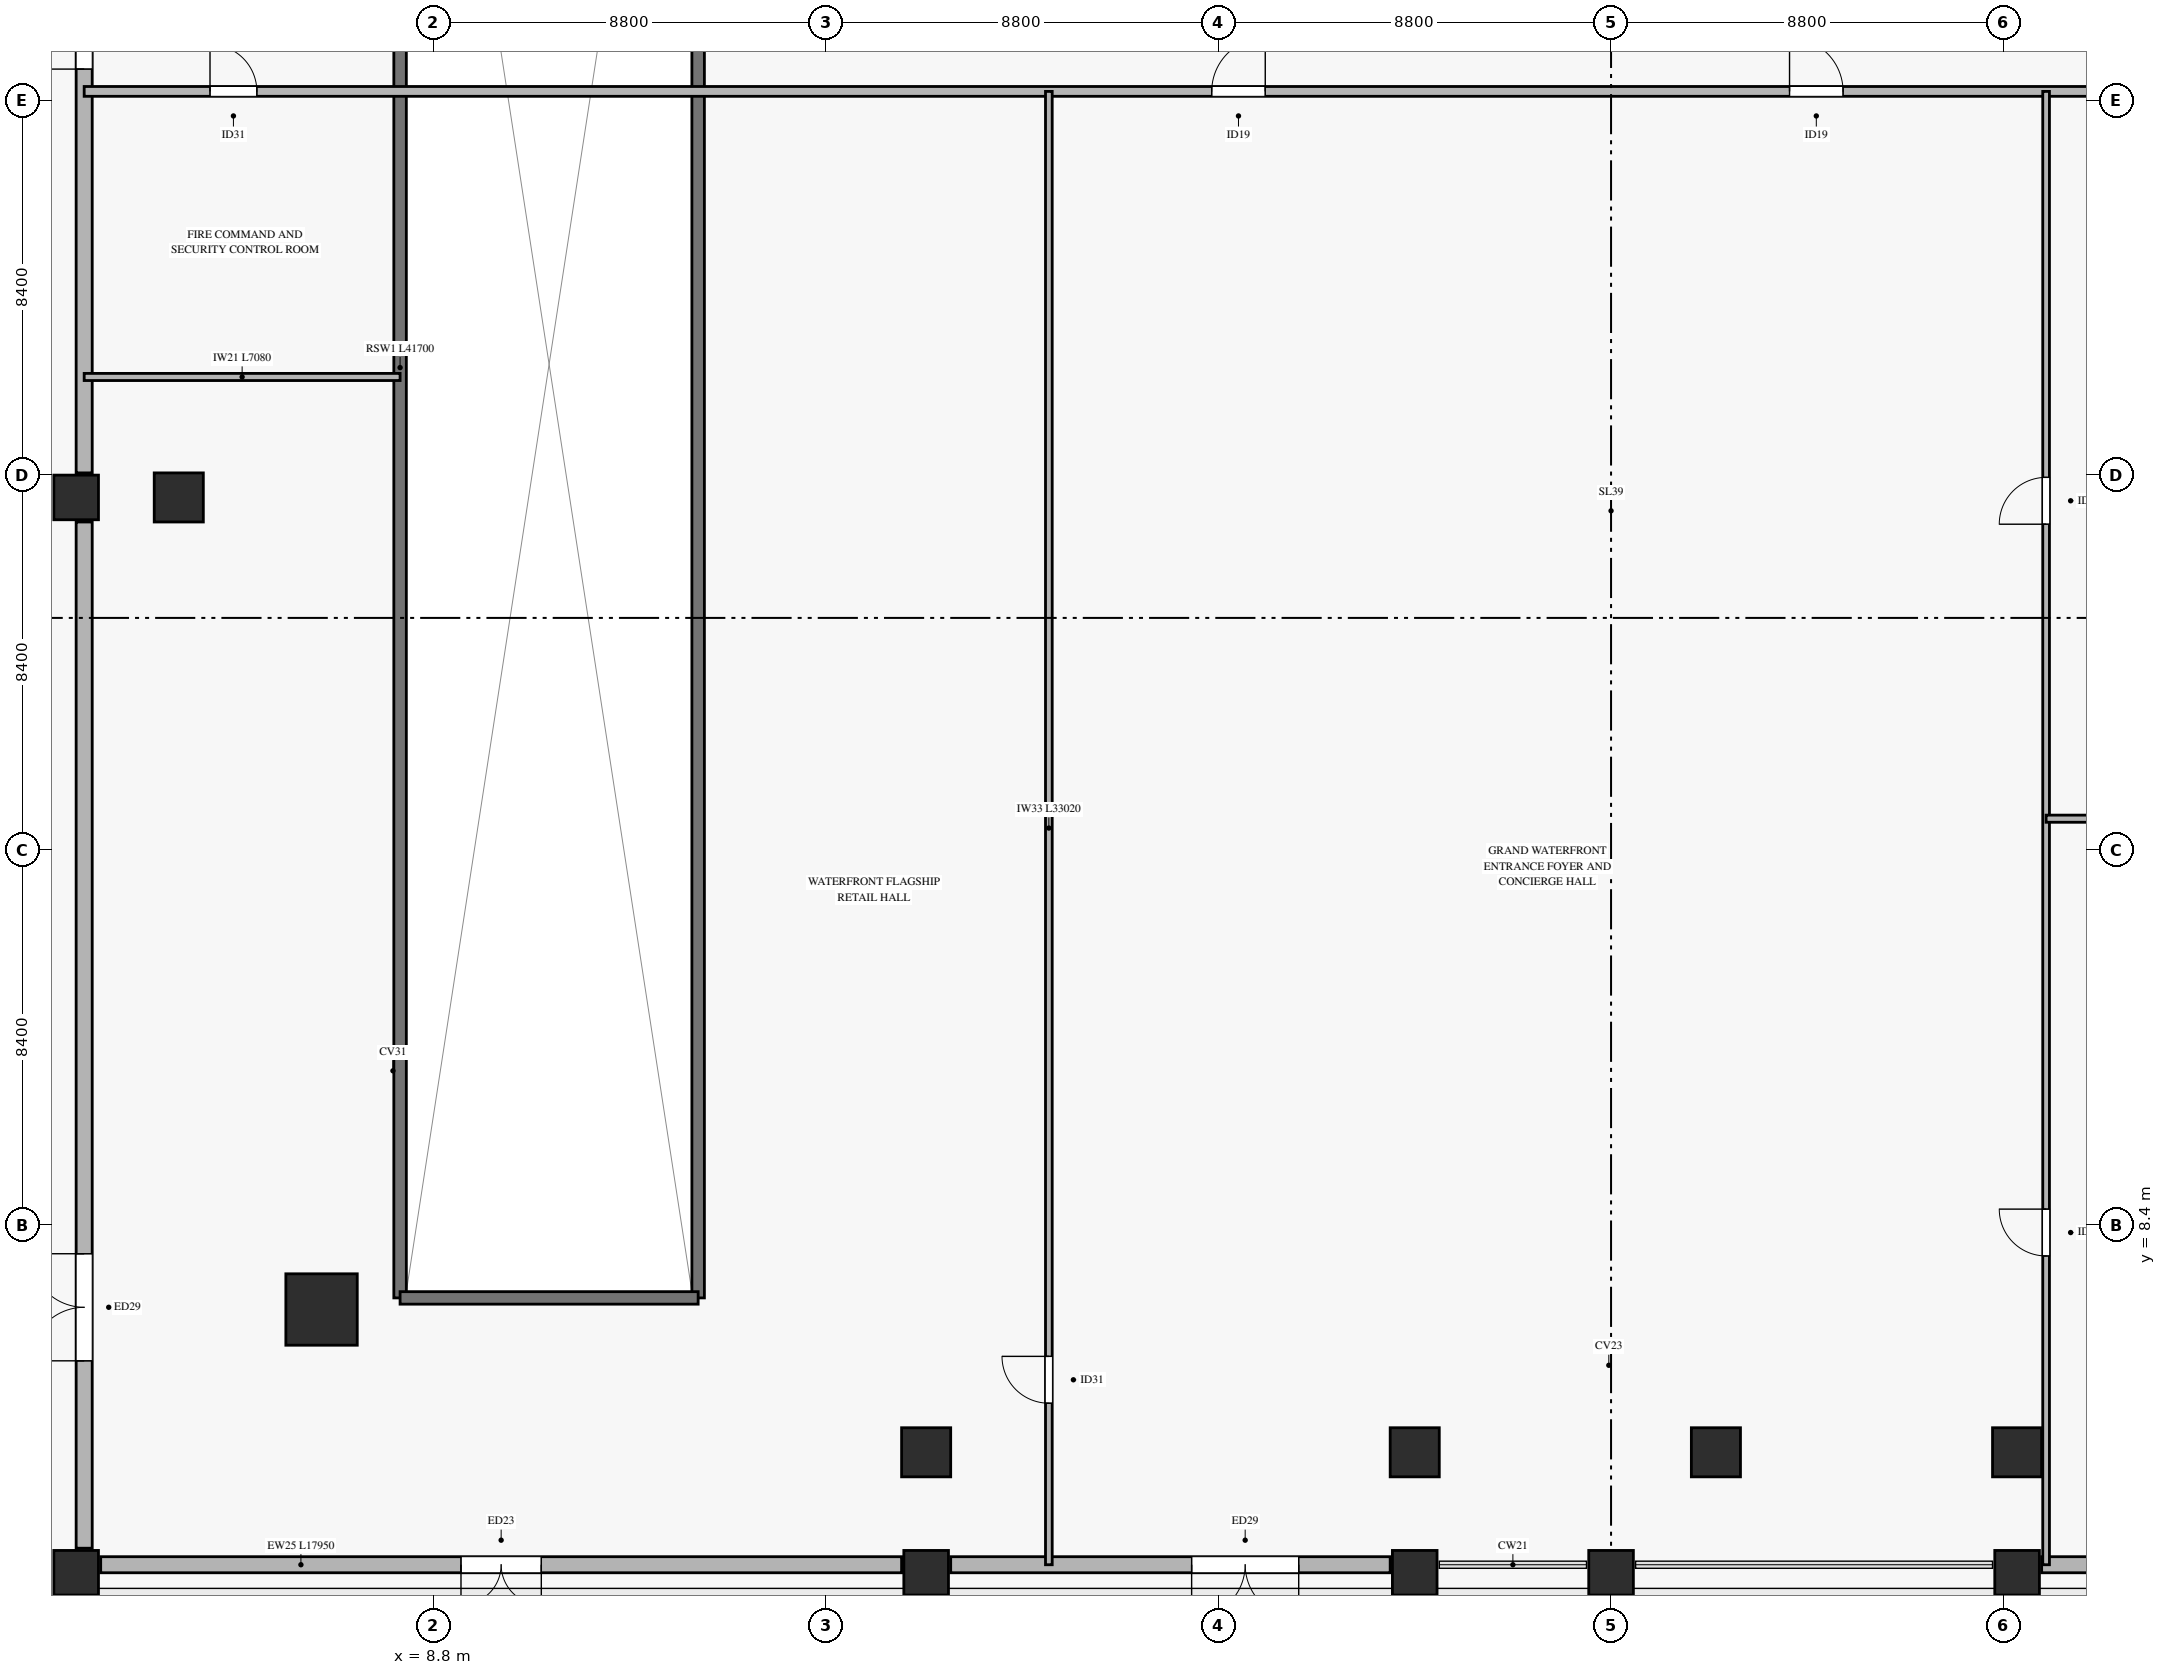
"""IFC4 building model, lengths in metres.
Left out: names, types, materials, properties, quantities, classifications, styles, units other than length and angle.
Written with IfcOpenShell. Run it as: python <this file> out.ifc"""

import sys

from ifc_helpers import new_model, si_unit, direction, frame, frame_2d, origin, origin_2d, place, context, subcontext, project, spatial, rectangle, hollow_rectangle, extrude, source, transform, mapped, element, fill, save


model = new_model("IFC4")
c1 = context("Model", 3, precision=1e-05, world=origin(), true_north=direction((0.0, 1.0)))
c2 = subcontext(c1, "Body", "Model", "MODEL_VIEW")
j1 = project(units=[si_unit("LENGTHUNIT", "METRE"), si_unit("PLANEANGLEUNIT", "RADIAN")], contexts=[c1])
p1 = place(None, origin())
s1 = spatial("IfcSite", under=j1, at=p1, CompositionType="ELEMENT")
p2 = place(p1, origin())
s2 = spatial("IfcBuilding", under=s1, at=p2, CompositionType="ELEMENT")
p3 = place(p2, origin())
s3 = spatial("IfcBuildingStorey", under=s2, at=p3, CompositionType="ELEMENT", Elevation=0.0)
m1 = source(origin(), c2, "Body", "SweptSolid", [
    extrude(hollow_rectangle(XDim=1.6, YDim=1.6, WallThickness=0.075, at=origin_2d()), origin(), (0.0, 0.0, 1.0), 5.34),
])
p4 = place(p3, frame((6.3, 6.5, 0.0), z_axis=(0.0, 0.0, 1.0), x_axis=(1.0, 0.0, 0.0)))
e1 = element("IfcColumn", 1, at=p4, inside=s3, PredefinedType="COLUMN", context=c2, shape_type="MappedRepresentation", body=[
    mapped(m1, transform((0.0, 0.0, 0.0), x_axis=(1.0, 0.0, 0.0), y_axis=(0.0, 1.0, 0.0), z_axis=(0.0, 0.0, 1.0), scale=1.0)),
])
m2 = source(origin(), c2, "Body", "SweptSolid", [
    extrude(hollow_rectangle(XDim=1.1, YDim=1.1, WallThickness=0.05, at=origin_2d()), origin(), (0.0, 0.0, 1.0), 5.34),
])
for number, where, z_axis, x_axis in (
    (2, (19.85, 3.3, 0.0), (0.0, 0.0, 1.0), (1.0, 0.0, 0.0)),
    (3, (30.8, 3.3, 0.0), (0.0, 0.0, 1.0), (1.0, 0.0, 0.0)),
    (4, (37.55, 3.3, 0.0), (0.0, 0.0, 1.0), (1.0, 0.0, 0.0)),
    (5, (44.3, 3.3, 0.0), (0.0, 0.0, 1.0), (1.0, 0.0, 0.0)),
    (6, (3.1, 24.7, 0.0), (0.0, 0.0, 1.0), (1.0, 0.0, 0.0)),
):
    element("IfcColumn", number, at=place(p3, frame(where, z_axis=z_axis, x_axis=x_axis)), inside=s3, PredefinedType="COLUMN", context=c2, shape_type="MappedRepresentation", body=[
        mapped(m2, transform((0.0, 0.0, 0.0), x_axis=(1.0, 0.0, 0.0), y_axis=(0.0, 1.0, 0.0), z_axis=(0.0, 0.0, 1.0), scale=1.0)),
    ])
m3 = source(origin(), c2, "Body", "SweptSolid", [
    extrude(hollow_rectangle(XDim=1.0, YDim=1.0, WallThickness=0.045, at=origin_2d()), origin(), (0.0, 0.0, 1.0), 5.34),
])
for number, where, z_axis, x_axis in (
    (7, (0.8, 0.6, 0.0), (0.0, 0.0, 1.0), (1.0, 0.0, 0.0)),
    (8, (19.85, 0.6, 0.0), (0.0, 0.0, 1.0), (1.0, 0.0, 0.0)),
    (9, (30.8, 0.6, 0.0), (0.0, 0.0, 1.0), (1.0, 0.0, 0.0)),
    (10, (35.2, 0.6, 0.0), (0.0, 0.0, 1.0), (1.0, 0.0, 0.0)),
    (11, (44.3, 0.6, 0.0), (0.0, 0.0, 1.0), (1.0, 0.0, 0.0)),
    (12, (0.8, 24.7, 0.0), (0.0, 0.0, 1.0), (1.0, 0.0, 0.0)),
):
    element("IfcColumn", number, at=place(p3, frame(where, z_axis=z_axis, x_axis=x_axis)), inside=s3, PredefinedType="COLUMN", context=c2, shape_type="MappedRepresentation", body=[
        mapped(m3, transform((0.0, 0.0, 0.0), x_axis=(1.0, 0.0, 0.0), y_axis=(0.0, 1.0, 0.0), z_axis=(0.0, 0.0, 1.0), scale=1.0)),
    ])
for number, where, z_axis, x_axis in (
    (13, (8.06, 6.76, 0.0), (0.0, 0.0, 1.0), (0.0, 1.0, 0.0)),
    (14, (14.74, 6.76, 0.0), (0.0, 0.0, 1.0), (0.0, 1.0, 0.0)),
):
    element("IfcWall", number, at=place(p3, frame(where, z_axis=z_axis, x_axis=x_axis)), inside=s3, PredefinedType="SOLIDWALL", context=c2, shape_type="SweptSolid", body=[
        extrude(rectangle(XDim=41.7, YDim=0.28, at=frame_2d((20.85, 0.0))), origin(), (0.0, 0.0, 1.0), 4.35),
    ])
p5 = place(p3, frame((8.06, 6.76, 0.0), z_axis=(0.0, 0.0, 1.0), x_axis=(1.0, 0.0, 0.0)))
e15 = element("IfcWall", 15, at=p5, inside=s3, PredefinedType="SOLIDWALL", context=c2, shape_type="SweptSolid", body=[
    extrude(rectangle(XDim=6.68, YDim=0.28, at=frame_2d((3.34, 0.0))), origin(), (0.0, 0.0, 1.0), 4.35),
])
p6 = place(p3, frame((1.35, 0.78, 0.0), z_axis=(0.0, 0.0, 1.0), x_axis=(1.0, 0.0, 0.0)))
e16 = element("IfcWall", 16, at=p6, inside=s3, PredefinedType="SOLIDWALL", context=c2, shape_type="SweptSolid", body=[
    extrude(rectangle(XDim=17.95, YDim=0.36, at=frame_2d((8.975, 0.0))), origin(), (0.0, 0.0, 1.0), 4.22),
])
p7 = place(p6, frame((8.075, 0.0, 0.0)))
e17 = element("IfcOpeningElement", 17, at=p7, cuts=e16, PredefinedType="OPENING", context=c2, shape_type="SweptSolid", body=[
    extrude(rectangle(XDim=1.8, YDim=2.4, at=frame_2d((0.9, 1.2))), frame((0.0, 0.19, 0.0), z_axis=(0.0, -1.0, 0.0), x_axis=(1.0, 0.0, 0.0)), (0.0, 0.0, 1.0), 0.38),
])
p8 = place(p3, frame((20.4, 0.78, 0.0), z_axis=(0.0, 0.0, 1.0), x_axis=(1.0, 0.0, 0.0)))
e18 = element("IfcWall", 18, at=p8, inside=s3, PredefinedType="SOLIDWALL", context=c2, shape_type="SweptSolid", body=[
    extrude(rectangle(XDim=9.85, YDim=0.36, at=frame_2d((4.925, 0.0))), origin(), (0.0, 0.0, 1.0), 4.22),
])
p9 = place(p8, frame((5.4, 0.0, 0.0)))
e19 = element("IfcOpeningElement", 19, at=p9, cuts=e18, PredefinedType="OPENING", context=c2, shape_type="SweptSolid", body=[
    extrude(rectangle(XDim=2.4, YDim=2.6, at=frame_2d((1.2, 1.3))), frame((0.0, 0.19, 0.0), z_axis=(0.0, -1.0, 0.0), x_axis=(1.0, 0.0, 0.0)), (0.0, 0.0, 1.0), 0.38),
])
p10 = place(p3, frame((44.85, 0.78, 0.0), z_axis=(0.0, 0.0, 1.0), x_axis=(1.0, 0.0, 0.0)))
e20 = element("IfcWall", 20, at=p10, inside=s3, PredefinedType="SOLIDWALL", context=c2, shape_type="SweptSolid", body=[
    extrude(rectangle(XDim=5.15, YDim=0.36, at=frame_2d((2.575, 0.0))), origin(), (0.0, 0.0, 1.0), 4.22),
])
p11 = place(p10, frame((2.2, 0.0, 0.0)))
e21 = element("IfcOpeningElement", 21, at=p11, cuts=e20, PredefinedType="OPENING", context=c2, shape_type="SweptSolid", body=[
    extrude(rectangle(XDim=2.4, YDim=2.6, at=frame_2d((1.2, 1.3))), frame((0.0, 0.19, 0.0), z_axis=(0.0, -1.0, 0.0), x_axis=(1.0, 0.0, 0.0)), (0.0, 0.0, 1.0), 0.38),
])
p12 = place(p3, frame((0.98, 1.15, 0.0), z_axis=(0.0, 0.0, 1.0), x_axis=(0.0, 1.0, 0.0)))
e22 = element("IfcWall", 22, at=p12, inside=s3, PredefinedType="SOLIDWALL", context=c2, shape_type="SweptSolid", body=[
    extrude(rectangle(XDim=23.0, YDim=0.36, at=frame_2d((11.5, 0.0))), origin(), (0.0, 0.0, 1.0), 4.22),
])
p13 = place(p12, frame((4.2, 0.0, 0.0)))
e23 = element("IfcOpeningElement", 23, at=p13, cuts=e22, PredefinedType="OPENING", context=c2, shape_type="SweptSolid", body=[
    extrude(rectangle(XDim=2.4, YDim=2.6, at=frame_2d((1.2, 1.3))), frame((0.0, 0.19, 0.0), z_axis=(0.0, -1.0, 0.0), x_axis=(1.0, 0.0, 0.0)), (0.0, 0.0, 1.0), 0.38),
])
p14 = place(p3, frame((0.98, 25.25, 0.0), z_axis=(0.0, 0.0, 1.0), x_axis=(0.0, 1.0, 0.0)))
e24 = element("IfcWall", 24, at=p14, inside=s3, PredefinedType="SOLIDWALL", context=c2, shape_type="SweptSolid", body=[
    extrude(rectangle(XDim=11.65, YDim=0.36, at=frame_2d((5.825, 0.0))), origin(), (0.0, 0.0, 1.0), 4.22),
])
p15 = place(p14, frame((9.05, 0.0, 0.0)))
e25 = element("IfcOpeningElement", 25, at=p15, cuts=e24, PredefinedType="OPENING", context=c2, shape_type="SweptSolid", body=[
    extrude(rectangle(XDim=2.4, YDim=2.6, at=frame_2d((1.2, 1.3))), frame((0.0, 0.19, 0.0), z_axis=(0.0, -1.0, 0.0), x_axis=(1.0, 0.0, 0.0)), (0.0, 0.0, 1.0), 0.38),
])
p16 = place(p3, frame((0.98, 33.8, 0.0), z_axis=(0.0, 0.0, 1.0), x_axis=(1.0, 0.0, 0.0)))
e26 = element("IfcWall", 26, at=p16, inside=s3, PredefinedType="SOLIDWALL", context=c2, shape_type="SweptSolid", body=[
    extrude(rectangle(XDim=68.44, YDim=0.22, at=frame_2d((34.22, 0.0))), origin(), (0.0, 0.0, 1.0), 4.225),
])
p17 = place(p16, frame((25.27, 0.0, 0.0)))
e27 = element("IfcOpeningElement", 27, at=p17, cuts=e26, PredefinedType="OPENING", context=c2, shape_type="SweptSolid", body=[
    extrude(rectangle(XDim=1.2, YDim=2.15, at=frame_2d((0.6, 1.075))), frame((0.0, 0.12, 0.0), z_axis=(0.0, -1.0, 0.0), x_axis=(1.0, 0.0, 0.0)), (0.0, 0.0, 1.0), 0.24),
])
p18 = place(p16, frame((38.22, 0.0, 0.0)))
e28 = element("IfcOpeningElement", 28, at=p18, cuts=e26, PredefinedType="OPENING", context=c2, shape_type="SweptSolid", body=[
    extrude(rectangle(XDim=1.2, YDim=2.15, at=frame_2d((0.6, 1.075))), frame((0.0, 0.12, 0.0), z_axis=(0.0, -1.0, 0.0), x_axis=(1.0, 0.0, 0.0)), (0.0, 0.0, 1.0), 0.24),
])
p19 = place(p16, frame((2.82, 0.0, 0.0)))
e29 = element("IfcOpeningElement", 29, at=p19, cuts=e26, PredefinedType="OPENING", context=c2, shape_type="SweptSolid", body=[
    extrude(rectangle(XDim=1.05, YDim=2.15, at=frame_2d((0.525, 1.075))), frame((0.0, 0.12, 0.0), z_axis=(0.0, -1.0, 0.0), x_axis=(1.0, 0.0, 0.0)), (0.0, 0.0, 1.0), 0.24),
])
p20 = place(p3, frame((22.6, 0.78, 0.0), z_axis=(0.0, 0.0, 1.0), x_axis=(0.0, 1.0, 0.0)))
e30 = element("IfcWall", 30, at=p20, inside=s3, PredefinedType="PARTITIONING", context=c2, shape_type="SweptSolid", body=[
    extrude(rectangle(XDim=33.02, YDim=0.15, at=frame_2d((16.51, 0.0))), origin(), (0.0, 0.0, 1.0), 4.225),
])
p21 = place(p20, frame((3.62, 0.0, 0.0)))
e31 = element("IfcOpeningElement", 31, at=p21, cuts=e30, PredefinedType="OPENING", context=c2, shape_type="SweptSolid", body=[
    extrude(rectangle(XDim=1.05, YDim=2.15, at=frame_2d((0.525, 1.075))), frame((0.0, 0.085, 0.0), z_axis=(0.0, -1.0, 0.0), x_axis=(1.0, 0.0, 0.0)), (0.0, 0.0, 1.0), 0.17),
])
p22 = place(p3, frame((44.95, 0.78, 0.0), z_axis=(0.0, 0.0, 1.0), x_axis=(0.0, 1.0, 0.0)))
e32 = element("IfcWall", 32, at=p22, inside=s3, PredefinedType="PARTITIONING", context=c2, shape_type="SweptSolid", body=[
    extrude(rectangle(XDim=33.02, YDim=0.15, at=frame_2d((16.51, 0.0))), origin(), (0.0, 0.0, 1.0), 4.225),
])
p23 = place(p22, frame((6.92, 0.0, 0.0)))
e33 = element("IfcOpeningElement", 33, at=p23, cuts=e32, PredefinedType="OPENING", context=c2, shape_type="SweptSolid", body=[
    extrude(rectangle(XDim=1.05, YDim=2.15, at=frame_2d((0.525, 1.075))), frame((0.0, 0.085, 0.0), z_axis=(0.0, -1.0, 0.0), x_axis=(1.0, 0.0, 0.0)), (0.0, 0.0, 1.0), 0.17),
])
p24 = place(p22, frame((23.32, 0.0, 0.0)))
e34 = element("IfcOpeningElement", 34, at=p24, cuts=e32, PredefinedType="OPENING", context=c2, shape_type="SweptSolid", body=[
    extrude(rectangle(XDim=1.05, YDim=2.15, at=frame_2d((0.525, 1.075))), frame((0.0, 0.085, 0.0), z_axis=(0.0, -1.0, 0.0), x_axis=(1.0, 0.0, 0.0)), (0.0, 0.0, 1.0), 0.17),
])
p25 = place(p3, frame((0.98, 27.4, 0.0), z_axis=(0.0, 0.0, 1.0), x_axis=(1.0, 0.0, 0.0)))
e35 = element("IfcWall", 35, at=p25, inside=s3, PredefinedType="PARTITIONING", context=c2, shape_type="SweptSolid", body=[
    extrude(rectangle(XDim=7.08, YDim=0.16, at=frame_2d((3.54, 0.0))), origin(), (0.0, 0.0, 1.0), 4.225),
])
p26 = place(p3, frame((44.95, 17.5, 0.0), z_axis=(0.0, 0.0, 1.0), x_axis=(1.0, 0.0, 0.0)))
e36 = element("IfcWall", 36, at=p26, inside=s3, PredefinedType="PARTITIONING", context=c2, shape_type="SweptSolid", body=[
    extrude(rectangle(XDim=24.47, YDim=0.16, at=frame_2d((12.235, 0.0))), origin(), (0.0, 0.0, 1.0), 4.225),
])
m4 = source(origin(), c2, "Body", "SweptSolid", [
    extrude(rectangle(XDim=1.8, YDim=2.4, at=frame_2d((0.9, 1.2))), frame((0.0, 0.025, 0.0), z_axis=(0.0, -1.0, 0.0), x_axis=(1.0, 0.0, 0.0)), (0.0, 0.0, 1.0), 0.05),
])
p27 = place(p7, frame((1.8, 0.0, 0.0), z_axis=(0.0, 0.0, 1.0), x_axis=(-1.0, 0.0, 0.0)))
e37 = element("IfcDoor", 37, at=p27, inside=s3, OperationType="DOUBLE_SWING_LEFT", PredefinedType="DOOR", context=c2, shape_type="MappedRepresentation", body=[
    mapped(m4, transform((0.0, 0.0, 0.0), x_axis=(1.0, 0.0, 0.0), y_axis=(0.0, 1.0, 0.0), z_axis=(0.0, 0.0, 1.0), scale=1.0)),
])
fill(e17, e37)
m5 = source(origin(), c2, "Body", "SweptSolid", [
    extrude(rectangle(XDim=2.4, YDim=2.6, at=frame_2d((1.2, 1.3))), frame((0.0, 0.025, 0.0), z_axis=(0.0, -1.0, 0.0), x_axis=(1.0, 0.0, 0.0)), (0.0, 0.0, 1.0), 0.05),
])
p28 = place(p9, frame((2.4, 0.0, 0.0), z_axis=(0.0, 0.0, 1.0), x_axis=(-1.0, 0.0, 0.0)))
e38 = element("IfcDoor", 38, at=p28, inside=s3, OperationType="DOUBLE_SWING_RIGHT", PredefinedType="DOOR", context=c2, shape_type="MappedRepresentation", body=[
    mapped(m5, transform((0.0, 0.0, 0.0), x_axis=(1.0, 0.0, 0.0), y_axis=(0.0, 1.0, 0.0), z_axis=(0.0, 0.0, 1.0), scale=1.0)),
])
fill(e19, e38)
p29 = place(p13, origin())
e39 = element("IfcDoor", 39, at=p29, inside=s3, OperationType="DOUBLE_SWING_LEFT", PredefinedType="DOOR", context=c2, shape_type="MappedRepresentation", body=[
    mapped(m5, transform((0.0, 0.0, 0.0), x_axis=(1.0, 0.0, 0.0), y_axis=(0.0, 1.0, 0.0), z_axis=(0.0, 0.0, 1.0), scale=1.0)),
])
fill(e23, e39)
p30 = place(p15, origin())
e40 = element("IfcDoor", 40, at=p30, inside=s3, OperationType="DOUBLE_SWING_LEFT", PredefinedType="DOOR", context=c2, shape_type="MappedRepresentation", body=[
    mapped(m5, transform((0.0, 0.0, 0.0), x_axis=(1.0, 0.0, 0.0), y_axis=(0.0, 1.0, 0.0), z_axis=(0.0, 0.0, 1.0), scale=1.0)),
])
fill(e25, e40)
m6 = source(origin(), c2, "Body", "SweptSolid", [
    extrude(rectangle(XDim=1.2, YDim=2.15, at=frame_2d((0.6, 1.075))), frame((0.0, 0.025, 0.0), z_axis=(0.0, -1.0, 0.0), x_axis=(1.0, 0.0, 0.0)), (0.0, 0.0, 1.0), 0.05),
])
p31 = place(p17, origin())
e41 = element("IfcDoor", 41, at=p31, inside=s3, OperationType="SINGLE_SWING_RIGHT", PredefinedType="DOOR", context=c2, shape_type="MappedRepresentation", body=[
    mapped(m6, transform((0.0, 0.0, 0.0), x_axis=(1.0, 0.0, 0.0), y_axis=(0.0, 1.0, 0.0), z_axis=(0.0, 0.0, 1.0), scale=1.0)),
])
fill(e27, e41)
p32 = place(p18, origin())
e42 = element("IfcDoor", 42, at=p32, inside=s3, OperationType="SINGLE_SWING_LEFT", PredefinedType="DOOR", context=c2, shape_type="MappedRepresentation", body=[
    mapped(m6, transform((0.0, 0.0, 0.0), x_axis=(1.0, 0.0, 0.0), y_axis=(0.0, 1.0, 0.0), z_axis=(0.0, 0.0, 1.0), scale=1.0)),
])
fill(e28, e42)
m7 = source(origin(), c2, "Body", "SweptSolid", [
    extrude(rectangle(XDim=1.05, YDim=2.15, at=frame_2d((0.525, 1.075))), frame((0.0, 0.025, 0.0), z_axis=(0.0, -1.0, 0.0), x_axis=(1.0, 0.0, 0.0)), (0.0, 0.0, 1.0), 0.05),
])
p33 = place(p21, origin())
e43 = element("IfcDoor", 43, at=p33, inside=s3, OperationType="SINGLE_SWING_RIGHT", PredefinedType="DOOR", context=c2, shape_type="MappedRepresentation", body=[
    mapped(m7, transform((0.0, 0.0, 0.0), x_axis=(1.0, 0.0, 0.0), y_axis=(0.0, 1.0, 0.0), z_axis=(0.0, 0.0, 1.0), scale=1.0)),
])
fill(e31, e43)
p34 = place(p19, origin())
e44 = element("IfcDoor", 44, at=p34, inside=s3, OperationType="SINGLE_SWING_LEFT", PredefinedType="DOOR", context=c2, shape_type="MappedRepresentation", body=[
    mapped(m7, transform((0.0, 0.0, 0.0), x_axis=(1.0, 0.0, 0.0), y_axis=(0.0, 1.0, 0.0), z_axis=(0.0, 0.0, 1.0), scale=1.0)),
])
fill(e29, e44)
p35 = place(p23, origin())
e45 = element("IfcDoor", 45, at=p35, inside=s3, OperationType="SINGLE_SWING_RIGHT", PredefinedType="DOOR", context=c2, shape_type="MappedRepresentation", body=[
    mapped(m7, transform((0.0, 0.0, 0.0), x_axis=(1.0, 0.0, 0.0), y_axis=(0.0, 1.0, 0.0), z_axis=(0.0, 0.0, 1.0), scale=1.0)),
])
fill(e33, e45)
p36 = place(p24, origin())
e46 = element("IfcDoor", 46, at=p36, inside=s3, OperationType="SINGLE_SWING_LEFT", PredefinedType="DOOR", context=c2, shape_type="MappedRepresentation", body=[
    mapped(m7, transform((0.0, 0.0, 0.0), x_axis=(1.0, 0.0, 0.0), y_axis=(0.0, 1.0, 0.0), z_axis=(0.0, 0.0, 1.0), scale=1.0)),
])
fill(e34, e46)
save(model, sys.argv[1])
